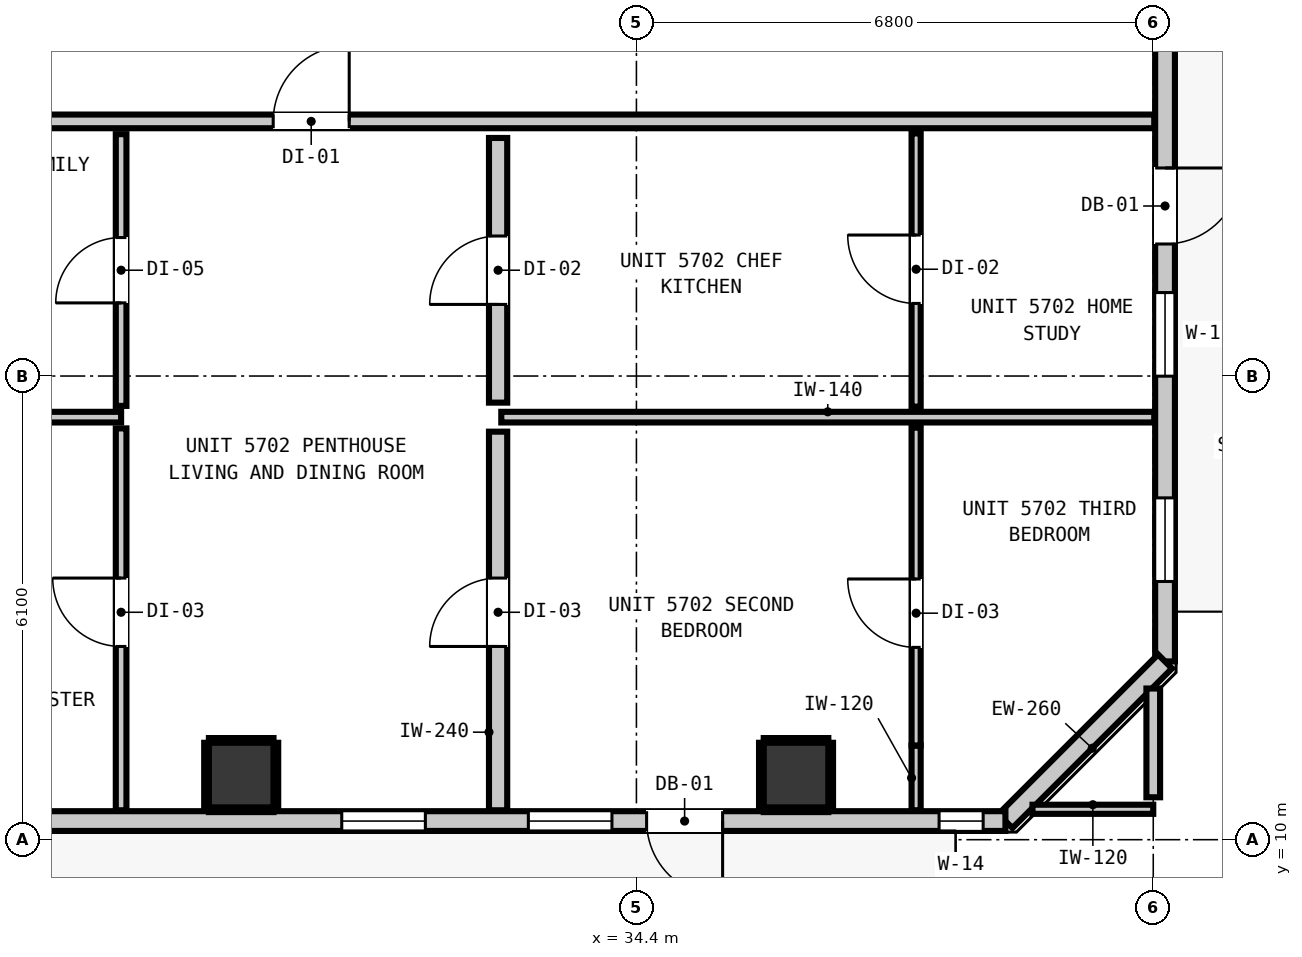
"""IFC4 building model, lengths in metres.
Left out: names, types, materials, properties, quantities, classifications, styles, units other than length and angle.
Written with IfcOpenShell. Run it as: python <this file> out.ifc"""

import sys

from ifc_helpers import new_model, si_unit, direction, frame, frame_2d, origin, origin_2d, place, context, subcontext, project, spatial, rectangle, extrude, element, fill, save


model = new_model("IFC4")
c1 = context("Model", 3, precision=1e-05, world=origin(), true_north=direction((0.0, 1.0)))
c2 = subcontext(c1, "Body", "Model", "MODEL_VIEW")
j1 = project(units=[si_unit("LENGTHUNIT", "METRE"), si_unit("PLANEANGLEUNIT", "RADIAN")], contexts=[c1])
p1 = place(None, origin())
s1 = spatial("IfcSite", under=j1, at=p1, CompositionType="ELEMENT")
p2 = place(p1, origin())
s2 = spatial("IfcBuilding", under=s1, at=p2, CompositionType="ELEMENT")
p3 = place(p2, frame((0.0, 0.0, 196.8)))
s3 = spatial("IfcBuildingStorey", under=s2, at=p3, CompositionType="ELEMENT", Elevation=196.8)
for number, where, z_axis, x_axis in (
    (1, (29.2, 10.85, 0.0), (0.0, 0.0, 1.0), (1.0, 0.0, 0.0)),
    (2, (36.5, 10.85, 0.0), (0.0, 0.0, 1.0), (1.0, 0.0, 0.0)),
):
    element("IfcColumn", number, at=place(p3, frame(where, z_axis=z_axis, x_axis=x_axis)), inside=s3, PredefinedType="COLUMN", context=c2, shape_type="SweptSolid", body=[
        extrude(rectangle(XDim=0.85, YDim=0.85, at=origin_2d()), origin(), (0.0, 0.0, 1.0), 3.32),
    ])
p4 = place(p3, frame((41.355, 42.655, 0.0), z_axis=(0.0, 0.0, 1.0), x_axis=(0.0, -1.0, 0.0)))
e3 = element("IfcWall", 3, at=p4, inside=s3, PredefinedType="STANDARD", context=c2, shape_type="SweptSolid", body=[
    extrude(rectangle(XDim=30.31, YDim=0.26, at=frame_2d((15.155, 0.0))), origin(), (0.0, 0.0, 1.0), 3.1),
])
p5 = place(p4, frame((23.818, 0.0, 0.0)))
e4 = element("IfcOpeningElement", 4, at=p5, cuts=e3, PredefinedType="OPENING", context=c2, shape_type="SweptSolid", body=[
    extrude(rectangle(XDim=1.0, YDim=2.15, at=frame_2d((0.5, 1.075))), frame((0.0, 0.14, 0.0), z_axis=(0.0, -1.0, 0.0), x_axis=(1.0, 0.0, 0.0)), (0.0, 0.0, 1.0), 0.28),
])
p6 = place(p4, frame((25.457, 0.0, 0.85)))
e5 = element("IfcOpeningElement", 5, at=p6, cuts=e3, PredefinedType="OPENING", context=c2, shape_type="SweptSolid", body=[
    extrude(rectangle(XDim=1.1, YDim=2.05, at=frame_2d((0.55, 1.025))), frame((0.0, 0.14, 0.0), z_axis=(0.0, -1.0, 0.0), x_axis=(1.0, 0.0, 0.0)), (0.0, 0.0, 1.0), 0.28),
])
p7 = place(p4, frame((28.158, 0.0, 0.85)))
e6 = element("IfcOpeningElement", 6, at=p7, cuts=e3, PredefinedType="OPENING", context=c2, shape_type="SweptSolid", body=[
    extrude(rectangle(XDim=1.1, YDim=2.05, at=frame_2d((0.55, 1.025))), frame((0.0, 0.14, 0.0), z_axis=(0.0, -1.0, 0.0), x_axis=(1.0, 0.0, 0.0)), (0.0, 0.0, 1.0), 0.28),
])
p8 = place(p3, frame((41.355, 12.345, 0.0), z_axis=(0.0, 0.0, 1.0), x_axis=(-0.707147883682, -0.707065676302, 0.0)))
e7 = element("IfcWall", 7, at=p8, inside=s3, PredefinedType="STANDARD", context=c2, shape_type="SweptSolid", body=[
    extrude(rectangle(XDim=2.97, YDim=0.26, at=frame_2d((1.485, 0.0))), origin(), (0.0, 0.0, 1.0), 3.1),
])
p9 = place(p3, frame((39.255, 10.245, 0.0), z_axis=(0.0, 0.0, 1.0), x_axis=(-1.0, 0.0, 0.0)))
e8 = element("IfcWall", 8, at=p9, inside=s3, PredefinedType="STANDARD", context=c2, shape_type="SweptSolid", body=[
    extrude(rectangle(XDim=32.71, YDim=0.26, at=frame_2d((16.355, 0.0))), origin(), (0.0, 0.0, 1.0), 3.1),
])
p10 = place(p9, frame((3.721, 0.0, 0.0)))
e9 = element("IfcOpeningElement", 9, at=p10, cuts=e8, PredefinedType="OPENING", context=c2, shape_type="SweptSolid", body=[
    extrude(rectangle(XDim=1.0, YDim=2.15, at=frame_2d((0.5, 1.075))), frame((0.0, 0.14, 0.0), z_axis=(0.0, -1.0, 0.0), x_axis=(1.0, 0.0, 0.0)), (0.0, 0.0, 1.0), 0.28),
])
p11 = place(p9, frame((27.576, 0.0, 0.85)))
e10 = element("IfcOpeningElement", 10, at=p11, cuts=e8, PredefinedType="OPENING", context=c2, shape_type="SweptSolid", body=[
    extrude(rectangle(XDim=1.1, YDim=2.05, at=frame_2d((0.55, 1.025))), frame((0.0, 0.14, 0.0), z_axis=(0.0, -1.0, 0.0), x_axis=(1.0, 0.0, 0.0)), (0.0, 0.0, 1.0), 0.28),
])
p12 = place(p9, frame((30.846, 0.0, 0.85)))
e11 = element("IfcOpeningElement", 11, at=p12, cuts=e8, PredefinedType="OPENING", context=c2, shape_type="SweptSolid", body=[
    extrude(rectangle(XDim=1.1, YDim=2.05, at=frame_2d((0.55, 1.025))), frame((0.0, 0.14, 0.0), z_axis=(0.0, -1.0, 0.0), x_axis=(1.0, 0.0, 0.0)), (0.0, 0.0, 1.0), 0.28),
])
p13 = place(p9, frame((21.515, 0.0, 0.85)))
e12 = element("IfcOpeningElement", 12, at=p13, cuts=e8, PredefinedType="OPENING", context=c2, shape_type="SweptSolid", body=[
    extrude(rectangle(XDim=1.1, YDim=2.05, at=frame_2d((0.55, 1.025))), frame((0.0, 0.14, 0.0), z_axis=(0.0, -1.0, 0.0), x_axis=(1.0, 0.0, 0.0)), (0.0, 0.0, 1.0), 0.28),
])
p14 = place(p9, frame((15.878, 0.0, 0.85)))
e13 = element("IfcOpeningElement", 13, at=p14, cuts=e8, PredefinedType="OPENING", context=c2, shape_type="SweptSolid", body=[
    extrude(rectangle(XDim=1.1, YDim=2.05, at=frame_2d((0.55, 1.025))), frame((0.0, 0.14, 0.0), z_axis=(0.0, -1.0, 0.0), x_axis=(1.0, 0.0, 0.0)), (0.0, 0.0, 1.0), 0.28),
])
p15 = place(p9, frame((7.632, 0.0, 0.85)))
e14 = element("IfcOpeningElement", 14, at=p15, cuts=e8, PredefinedType="OPENING", context=c2, shape_type="SweptSolid", body=[
    extrude(rectangle(XDim=1.1, YDim=2.05, at=frame_2d((0.55, 1.025))), frame((0.0, 0.14, 0.0), z_axis=(0.0, -1.0, 0.0), x_axis=(1.0, 0.0, 0.0)), (0.0, 0.0, 1.0), 0.28),
])
p16 = place(p9, frame((12.631, 0.0, 0.85)))
e15 = element("IfcOpeningElement", 15, at=p16, cuts=e8, PredefinedType="OPENING", context=c2, shape_type="SweptSolid", body=[
    extrude(rectangle(XDim=1.1, YDim=2.05, at=frame_2d((0.55, 1.025))), frame((0.0, 0.14, 0.0), z_axis=(0.0, -1.0, 0.0), x_axis=(1.0, 0.0, 0.0)), (0.0, 0.0, 1.0), 0.28),
])
p17 = place(p9, frame((5.177, 0.0, 0.85)))
e16 = element("IfcOpeningElement", 16, at=p17, cuts=e8, PredefinedType="OPENING", context=c2, shape_type="SweptSolid", body=[
    extrude(rectangle(XDim=1.1, YDim=2.05, at=frame_2d((0.55, 1.025))), frame((0.0, 0.14, 0.0), z_axis=(0.0, -1.0, 0.0), x_axis=(1.0, 0.0, 0.0)), (0.0, 0.0, 1.0), 0.28),
])
p18 = place(p9, frame((0.293, 0.0, 0.85)))
e17 = element("IfcOpeningElement", 17, at=p18, cuts=e8, PredefinedType="OPENING", context=c2, shape_type="SweptSolid", body=[
    extrude(rectangle(XDim=0.58, YDim=1.5, at=frame_2d((0.29, 0.75))), frame((0.0, 0.14, 0.0), z_axis=(0.0, -1.0, 0.0), x_axis=(1.0, 0.0, 0.0)), (0.0, 0.0, 1.0), 0.28),
])
p19 = place(p3, frame((4.587, 19.45, 0.0), z_axis=(0.0, 0.0, 1.0), x_axis=(1.0, 0.0, 0.0)))
e18 = element("IfcWall", 18, at=p19, inside=s3, PredefinedType="PARTITIONING", context=c2, shape_type="SweptSolid", body=[
    extrude(rectangle(XDim=36.626, YDim=0.18, at=frame_2d((18.313, 0.0))), origin(), (0.0, 0.0, 1.0), 3.1),
])
p20 = place(p19, frame((7.085, 0.0, 0.0)))
e19 = element("IfcOpeningElement", 19, at=p20, cuts=e18, PredefinedType="OPENING", context=c2, shape_type="SweptSolid", body=[
    extrude(rectangle(XDim=1.0, YDim=2.15, at=frame_2d((0.5, 1.075))), frame((0.0, 0.1, 0.0), z_axis=(0.0, -1.0, 0.0), x_axis=(1.0, 0.0, 0.0)), (0.0, 0.0, 1.0), 0.2),
])
p21 = place(p19, frame((25.034, 0.0, 0.0)))
e20 = element("IfcOpeningElement", 20, at=p21, cuts=e18, PredefinedType="OPENING", context=c2, shape_type="SweptSolid", body=[
    extrude(rectangle(XDim=1.0, YDim=2.15, at=frame_2d((0.5, 1.075))), frame((0.0, 0.1, 0.0), z_axis=(0.0, -1.0, 0.0), x_axis=(1.0, 0.0, 0.0)), (0.0, 0.0, 1.0), 0.2),
])
p22 = place(p3, frame((15.161, 15.559, 0.0), z_axis=(0.0, 0.0, 1.0), x_axis=(1.0, 0.0, 0.0)))
e21 = element("IfcWall", 21, at=p22, inside=s3, PredefinedType="PARTITIONING", context=c2, shape_type="SweptSolid", body=[
    extrude(rectangle(XDim=12.459, YDim=0.14, at=frame_2d((6.229, 0.0))), origin(), (0.0, 0.0, 1.0), 3.1),
])
p23 = place(p3, frame((32.622, 15.559, 0.0), z_axis=(0.0, 0.0, 1.0), x_axis=(1.0, 0.0, 0.0)))
e22 = element("IfcWall", 22, at=p23, inside=s3, PredefinedType="PARTITIONING", context=c2, shape_type="SweptSolid", body=[
    extrude(rectangle(XDim=8.591, YDim=0.14, at=frame_2d((4.295, 0.0))), origin(), (0.0, 0.0, 1.0), 3.1),
])
p24 = place(p3, frame((39.611, 10.4, 0.0), z_axis=(0.0, 0.0, 1.0), x_axis=(1.0, 0.0, 0.0)))
e23 = element("IfcWall", 23, at=p24, inside=s3, PredefinedType="PARTITIONING", context=c2, shape_type="SweptSolid", body=[
    extrude(rectangle(XDim=1.589, YDim=0.12, at=frame_2d((0.794, 0.0))), origin(), (0.0, 0.0, 1.0), 3.1),
])
p25 = place(p3, frame((32.58, 10.387, 0.0), z_axis=(0.0, 0.0, 1.0), x_axis=(0.0, 1.0, 0.0)))
e24 = element("IfcWall", 24, at=p25, inside=s3, PredefinedType="PARTITIONING", context=c2, shape_type="SweptSolid", body=[
    extrude(rectangle(XDim=4.981, YDim=0.24, at=frame_2d((2.49, 0.0))), origin(), (0.0, 0.0, 1.0), 3.1),
])
p26 = place(p25, frame((2.155, 0.0, 0.0)))
e25 = element("IfcOpeningElement", 25, at=p26, cuts=e24, PredefinedType="OPENING", context=c2, shape_type="SweptSolid", body=[
    extrude(rectangle(XDim=0.9, YDim=2.1, at=frame_2d((0.45, 1.05))), frame((0.0, 0.13, 0.0), z_axis=(0.0, -1.0, 0.0), x_axis=(1.0, 0.0, 0.0)), (0.0, 0.0, 1.0), 0.26),
])
p27 = place(p3, frame((32.58, 15.75, 0.0), z_axis=(0.0, 0.0, 1.0), x_axis=(0.0, 1.0, 0.0)))
e26 = element("IfcWall", 26, at=p27, inside=s3, PredefinedType="PARTITIONING", context=c2, shape_type="SweptSolid", body=[
    extrude(rectangle(XDim=3.482, YDim=0.24, at=frame_2d((1.741, 0.0))), origin(), (0.0, 0.0, 1.0), 3.1),
])
p28 = place(p27, frame((1.292, 0.0, 0.0)))
e27 = element("IfcOpeningElement", 27, at=p28, cuts=e26, PredefinedType="OPENING", context=c2, shape_type="SweptSolid", body=[
    extrude(rectangle(XDim=0.9, YDim=2.1, at=frame_2d((0.45, 1.05))), frame((0.0, 0.13, 0.0), z_axis=(0.0, -1.0, 0.0), x_axis=(1.0, 0.0, 0.0)), (0.0, 0.0, 1.0), 0.26),
])
p29 = place(p3, frame((41.2, 10.558, 0.0), z_axis=(0.0, 0.0, 1.0), x_axis=(0.0, 1.0, 0.0)))
e28 = element("IfcWall", 28, at=p29, inside=s3, PredefinedType="PARTITIONING", context=c2, shape_type="SweptSolid", body=[
    extrude(rectangle(XDim=1.431, YDim=0.18, at=frame_2d((0.715, 0.0))), origin(), (0.0, 0.0, 1.0), 3.1),
])
p30 = place(p3, frame((27.62, 10.387, 0.0), z_axis=(0.0, 0.0, 1.0), x_axis=(0.0, 1.0, 0.0)))
e29 = element("IfcWall", 29, at=p30, inside=s3, PredefinedType="PARTITIONING", context=c2, shape_type="SweptSolid", body=[
    extrude(rectangle(XDim=5.024, YDim=0.14, at=frame_2d((2.512, 0.0))), origin(), (0.0, 0.0, 1.0), 3.1),
])
p31 = place(p30, frame((2.155, 0.0, 0.0)))
e30 = element("IfcOpeningElement", 30, at=p31, cuts=e29, PredefinedType="OPENING", context=c2, shape_type="SweptSolid", body=[
    extrude(rectangle(XDim=0.9, YDim=2.1, at=frame_2d((0.45, 1.05))), frame((0.0, 0.08, 0.0), z_axis=(0.0, -1.0, 0.0), x_axis=(1.0, 0.0, 0.0)), (0.0, 0.0, 1.0), 0.16),
])
p32 = place(p3, frame((27.62, 15.707, 0.0), z_axis=(0.0, 0.0, 1.0), x_axis=(0.0, 1.0, 0.0)))
e31 = element("IfcWall", 31, at=p32, inside=s3, PredefinedType="PARTITIONING", context=c2, shape_type="SweptSolid", body=[
    extrude(rectangle(XDim=3.575, YDim=0.14, at=frame_2d((1.788, 0.0))), origin(), (0.0, 0.0, 1.0), 3.1),
])
p33 = place(p32, frame((1.355, 0.0, 0.0)))
e32 = element("IfcOpeningElement", 32, at=p33, cuts=e31, PredefinedType="OPENING", context=c2, shape_type="SweptSolid", body=[
    extrude(rectangle(XDim=0.86, YDim=2.02, at=frame_2d((0.43, 1.01))), frame((0.0, 0.08, 0.0), z_axis=(0.0, -1.0, 0.0), x_axis=(1.0, 0.0, 0.0)), (0.0, 0.0, 1.0), 0.16),
])
p34 = place(p3, frame((38.08, 10.387, 0.0), z_axis=(0.0, 0.0, 1.0), x_axis=(0.0, 1.0, 0.0)))
e33 = element("IfcWall", 33, at=p34, inside=s3, PredefinedType="PARTITIONING", context=c2, shape_type="SweptSolid", body=[
    extrude(rectangle(XDim=0.852, YDim=0.12, at=frame_2d((0.426, 0.0))), origin(), (0.0, 0.0, 1.0), 3.1),
])
p35 = place(p3, frame((38.08, 11.239, 0.0), z_axis=(0.0, 0.0, 1.0), x_axis=(0.0, 1.0, 0.0)))
e34 = element("IfcWall", 34, at=p35, inside=s3, PredefinedType="PARTITIONING", context=c2, shape_type="SweptSolid", body=[
    extrude(rectangle(XDim=4.182, YDim=0.12, at=frame_2d((2.091, 0.0))), origin(), (0.0, 0.0, 1.0), 2.477),
])
p36 = place(p35, frame((1.291, 0.0, 0.0)))
e35 = element("IfcOpeningElement", 35, at=p36, cuts=e34, PredefinedType="OPENING", context=c2, shape_type="SweptSolid", body=[
    extrude(rectangle(XDim=0.9, YDim=2.1, at=frame_2d((0.45, 1.05))), frame((0.0, 0.07, 0.0), z_axis=(0.0, -1.0, 0.0), x_axis=(1.0, 0.0, 0.0)), (0.0, 0.0, 1.0), 0.14),
])
p37 = place(p3, frame((38.08, 15.697, 0.0), z_axis=(0.0, 0.0, 1.0), x_axis=(0.0, 1.0, 0.0)))
e36 = element("IfcWall", 36, at=p37, inside=s3, PredefinedType="PARTITIONING", context=c2, shape_type="SweptSolid", body=[
    extrude(rectangle(XDim=3.595, YDim=0.12, at=frame_2d((1.797, 0.0))), origin(), (0.0, 0.0, 1.0), 3.1),
])
p38 = place(p37, frame((1.358, 0.0, 0.0)))
e37 = element("IfcOpeningElement", 37, at=p38, cuts=e36, PredefinedType="OPENING", context=c2, shape_type="SweptSolid", body=[
    extrude(rectangle(XDim=0.9, YDim=2.1, at=frame_2d((0.45, 1.05))), frame((0.0, 0.07, 0.0), z_axis=(0.0, -1.0, 0.0), x_axis=(1.0, 0.0, 0.0)), (0.0, 0.0, 1.0), 0.14),
])
for number, where, z_axis, x_axis in (
    (38, (28.775, 10.393, 0.0), (0.0, 0.0, 1.0), (1.0, 0.0, 0.0)),
    (39, (28.775, 11.307, 0.0), (0.0, 0.0, 1.0), (1.0, 0.0, 0.0)),
):
    element("IfcWall", number, at=place(p3, frame(where, z_axis=z_axis, x_axis=x_axis)), inside=s3, PredefinedType="PARTITIONING", context=c2, shape_type="SweptSolid", body=[
        extrude(rectangle(XDim=0.85, YDim=0.06, at=frame_2d((0.425, 0.0))), origin(), (0.0, 0.0, 1.0), 1.45),
    ])
for number, where, z_axis, x_axis in (
    (40, (28.743, 10.425, 0.0), (0.0, 0.0, 1.0), (0.0, 1.0, 0.0)),
    (41, (29.657, 10.425, 0.0), (0.0, 0.0, 1.0), (0.0, 1.0, 0.0)),
):
    element("IfcWall", number, at=place(p3, frame(where, z_axis=z_axis, x_axis=x_axis)), inside=s3, PredefinedType="PARTITIONING", context=c2, shape_type="SweptSolid", body=[
        extrude(rectangle(XDim=0.85, YDim=0.06, at=frame_2d((0.425, 0.0))), origin(), (0.0, 0.0, 1.0), 1.45),
    ])
for number, where, z_axis, x_axis in (
    (42, (36.075, 10.393, 0.0), (0.0, 0.0, 1.0), (1.0, 0.0, 0.0)),
    (43, (36.075, 11.307, 0.0), (0.0, 0.0, 1.0), (1.0, 0.0, 0.0)),
):
    element("IfcWall", number, at=place(p3, frame(where, z_axis=z_axis, x_axis=x_axis)), inside=s3, PredefinedType="PARTITIONING", context=c2, shape_type="SweptSolid", body=[
        extrude(rectangle(XDim=0.85, YDim=0.06, at=frame_2d((0.425, 0.0))), origin(), (0.0, 0.0, 1.0), 1.45),
    ])
for number, where, z_axis, x_axis in (
    (44, (36.043, 10.425, 0.0), (0.0, 0.0, 1.0), (0.0, 1.0, 0.0)),
    (45, (36.957, 10.425, 0.0), (0.0, 0.0, 1.0), (0.0, 1.0, 0.0)),
):
    element("IfcWall", number, at=place(p3, frame(where, z_axis=z_axis, x_axis=x_axis)), inside=s3, PredefinedType="PARTITIONING", context=c2, shape_type="SweptSolid", body=[
        extrude(rectangle(XDim=0.85, YDim=0.06, at=frame_2d((0.425, 0.0))), origin(), (0.0, 0.0, 1.0), 1.45),
    ])
p39 = place(p10, origin())
e46 = element("IfcDoor", 46, at=p39, inside=s3, OperationType="SINGLE_SWING_LEFT", PredefinedType="DOOR", context=c2, shape_type="SweptSolid", body=[
    extrude(rectangle(XDim=1.0, YDim=2.15, at=frame_2d((0.5, 1.075))), frame((0.0, 0.025, 0.0), z_axis=(0.0, -1.0, 0.0), x_axis=(1.0, 0.0, 0.0)), (0.0, 0.0, 1.0), 0.05),
])
fill(e9, e46)
p40 = place(p5, origin())
e47 = element("IfcDoor", 47, at=p40, inside=s3, OperationType="SINGLE_SWING_LEFT", PredefinedType="DOOR", context=c2, shape_type="SweptSolid", body=[
    extrude(rectangle(XDim=1.0, YDim=2.15, at=frame_2d((0.5, 1.075))), frame((0.0, 0.025, 0.0), z_axis=(0.0, -1.0, 0.0), x_axis=(1.0, 0.0, 0.0)), (0.0, 0.0, 1.0), 0.05),
])
fill(e4, e47)
p41 = place(p6, origin())
e48 = element("IfcWindow", 48, at=p41, inside=s3, PartitioningType="SINGLE_PANEL", PredefinedType="WINDOW", context=c2, shape_type="SweptSolid", body=[
    extrude(rectangle(XDim=1.1, YDim=2.05, at=frame_2d((0.55, 1.025))), frame((0.0, 0.03, 0.0), z_axis=(0.0, -1.0, 0.0), x_axis=(1.0, 0.0, 0.0)), (0.0, 0.0, 1.0), 0.06),
])
fill(e5, e48)
p42 = place(p7, origin())
e49 = element("IfcWindow", 49, at=p42, inside=s3, PartitioningType="SINGLE_PANEL", PredefinedType="WINDOW", context=c2, shape_type="SweptSolid", body=[
    extrude(rectangle(XDim=1.1, YDim=2.05, at=frame_2d((0.55, 1.025))), frame((0.0, 0.03, 0.0), z_axis=(0.0, -1.0, 0.0), x_axis=(1.0, 0.0, 0.0)), (0.0, 0.0, 1.0), 0.06),
])
fill(e6, e49)
p43 = place(p15, origin())
e50 = element("IfcWindow", 50, at=p43, inside=s3, PartitioningType="SINGLE_PANEL", PredefinedType="WINDOW", context=c2, shape_type="SweptSolid", body=[
    extrude(rectangle(XDim=1.1, YDim=2.05, at=frame_2d((0.55, 1.025))), frame((0.0, 0.03, 0.0), z_axis=(0.0, -1.0, 0.0), x_axis=(1.0, 0.0, 0.0)), (0.0, 0.0, 1.0), 0.06),
])
fill(e14, e50)
p44 = place(p17, origin())
e51 = element("IfcWindow", 51, at=p44, inside=s3, PartitioningType="SINGLE_PANEL", PredefinedType="WINDOW", context=c2, shape_type="SweptSolid", body=[
    extrude(rectangle(XDim=1.1, YDim=2.05, at=frame_2d((0.55, 1.025))), frame((0.0, 0.03, 0.0), z_axis=(0.0, -1.0, 0.0), x_axis=(1.0, 0.0, 0.0)), (0.0, 0.0, 1.0), 0.06),
])
fill(e16, e51)
p45 = place(p18, origin())
e52 = element("IfcWindow", 52, at=p45, inside=s3, PartitioningType="SINGLE_PANEL", PredefinedType="WINDOW", context=c2, shape_type="SweptSolid", body=[
    extrude(rectangle(XDim=0.58, YDim=1.5, at=frame_2d((0.29, 0.75))), frame((0.0, 0.03, 0.0), z_axis=(0.0, -1.0, 0.0), x_axis=(1.0, 0.0, 0.0)), (0.0, 0.0, 1.0), 0.06),
])
fill(e17, e52)
p46 = place(p21, origin())
e53 = element("IfcDoor", 53, at=p46, inside=s3, OperationType="SINGLE_SWING_RIGHT", PredefinedType="DOOR", context=c2, shape_type="SweptSolid", body=[
    extrude(rectangle(XDim=1.0, YDim=2.15, at=frame_2d((0.5, 1.075))), frame((0.0, 0.025, 0.0), z_axis=(0.0, -1.0, 0.0), x_axis=(1.0, 0.0, 0.0)), (0.0, 0.0, 1.0), 0.05),
])
fill(e20, e53)
p47 = place(p33, origin())
e54 = element("IfcDoor", 54, at=p47, inside=s3, OperationType="SINGLE_SWING_LEFT", PredefinedType="DOOR", context=c2, shape_type="SweptSolid", body=[
    extrude(rectangle(XDim=0.86, YDim=2.02, at=frame_2d((0.43, 1.01))), frame((0.0, 0.025, 0.0), z_axis=(0.0, -1.0, 0.0), x_axis=(1.0, 0.0, 0.0)), (0.0, 0.0, 1.0), 0.05),
])
fill(e32, e54)
p48 = place(p31, origin())
e55 = element("IfcDoor", 55, at=p48, inside=s3, OperationType="SINGLE_SWING_RIGHT", PredefinedType="DOOR", context=c2, shape_type="SweptSolid", body=[
    extrude(rectangle(XDim=0.9, YDim=2.1, at=frame_2d((0.45, 1.05))), frame((0.0, 0.025, 0.0), z_axis=(0.0, -1.0, 0.0), x_axis=(1.0, 0.0, 0.0)), (0.0, 0.0, 1.0), 0.05),
])
fill(e30, e55)
p49 = place(p28, origin())
e56 = element("IfcDoor", 56, at=p49, inside=s3, OperationType="SINGLE_SWING_LEFT", PredefinedType="DOOR", context=c2, shape_type="SweptSolid", body=[
    extrude(rectangle(XDim=0.9, YDim=2.1, at=frame_2d((0.45, 1.05))), frame((0.0, 0.025, 0.0), z_axis=(0.0, -1.0, 0.0), x_axis=(1.0, 0.0, 0.0)), (0.0, 0.0, 1.0), 0.05),
])
fill(e27, e56)
p50 = place(p38, origin())
e57 = element("IfcDoor", 57, at=p50, inside=s3, OperationType="SINGLE_SWING_RIGHT", PredefinedType="DOOR", context=c2, shape_type="SweptSolid", body=[
    extrude(rectangle(XDim=0.9, YDim=2.1, at=frame_2d((0.45, 1.05))), frame((0.0, 0.025, 0.0), z_axis=(0.0, -1.0, 0.0), x_axis=(1.0, 0.0, 0.0)), (0.0, 0.0, 1.0), 0.05),
])
fill(e37, e57)
p51 = place(p26, origin())
e58 = element("IfcDoor", 58, at=p51, inside=s3, OperationType="SINGLE_SWING_LEFT", PredefinedType="DOOR", context=c2, shape_type="SweptSolid", body=[
    extrude(rectangle(XDim=0.9, YDim=2.1, at=frame_2d((0.45, 1.05))), frame((0.0, 0.025, 0.0), z_axis=(0.0, -1.0, 0.0), x_axis=(1.0, 0.0, 0.0)), (0.0, 0.0, 1.0), 0.05),
])
fill(e25, e58)
p52 = place(p36, origin())
e59 = element("IfcDoor", 59, at=p52, inside=s3, OperationType="SINGLE_SWING_RIGHT", PredefinedType="DOOR", context=c2, shape_type="SweptSolid", body=[
    extrude(rectangle(XDim=0.9, YDim=2.1, at=frame_2d((0.45, 1.05))), frame((0.0, 0.025, 0.0), z_axis=(0.0, -1.0, 0.0), x_axis=(1.0, 0.0, 0.0)), (0.0, 0.0, 1.0), 0.05),
])
fill(e35, e59)
save(model, sys.argv[1])
